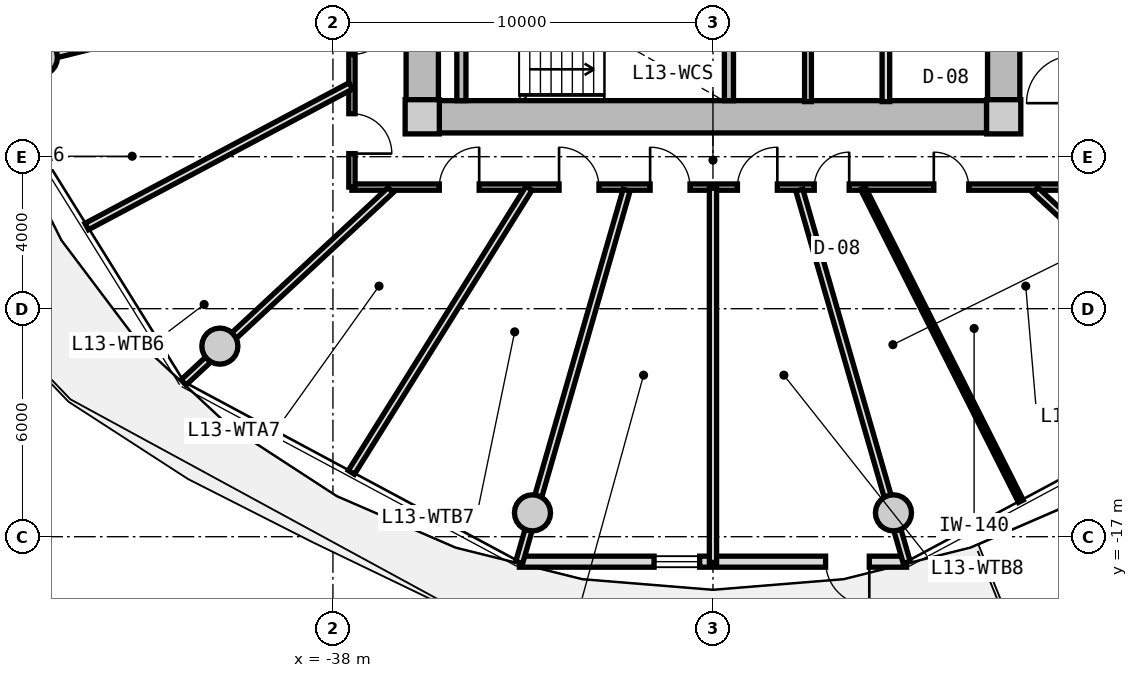
"""IFC4 building model, lengths in metres.
Left out: names, types, materials, properties, quantities, classifications, styles, units other than length and angle.
Written with IfcOpenShell. Run it as: python <this file> out.ifc"""

import sys

from ifc_helpers import new_model, si_unit, direction, frame, frame_2d, origin, origin_2d, place, context, subcontext, project, spatial, rectangle, circle, extrude, source, transform, mapped, element, fill, save


model = new_model("IFC4")
c1 = context("Model", 3, precision=1e-05, world=origin(), true_north=direction((0.0, 1.0)))
c2 = subcontext(c1, "Body", "Model", "MODEL_VIEW")
j1 = project(units=[si_unit("LENGTHUNIT", "METRE"), si_unit("PLANEANGLEUNIT", "RADIAN")], contexts=[c1])
p1 = place(None, origin())
s1 = spatial("IfcSite", under=j1, at=p1, CompositionType="ELEMENT")
p2 = place(p1, origin())
s2 = spatial("IfcBuilding", under=s1, at=p2, CompositionType="ELEMENT")
p3 = place(p2, frame((0.0, 0.0, 46.0)))
s3 = spatial("IfcBuildingStorey", under=s2, at=p3, CompositionType="ELEMENT", Elevation=46.0)
m1 = source(origin(), c2, "Body", "SweptSolid", [
    extrude(rectangle(XDim=0.9, YDim=0.9, at=origin_2d()), origin(), (0.0, 0.0, 1.0), 3.05),
])
for number, where, z_axis, x_axis in (
    (1, (-35.65, -5.95, 0.0), (0.0, 0.0, 1.0), (1.0, 0.0, 0.0)),
    (2, (-20.35, -5.95, 0.0), (0.0, 0.0, 1.0), (1.0, 0.0, 0.0)),
):
    element("IfcColumn", number, at=place(p3, frame(where, z_axis=z_axis, x_axis=x_axis)), inside=s3, PredefinedType="COLUMN", context=c2, shape_type="MappedRepresentation", body=[
        mapped(m1, transform((0.0, 0.0, 0.0), x_axis=(1.0, 0.0, 0.0), y_axis=(0.0, 1.0, 0.0), z_axis=(0.0, 0.0, 1.0), scale=1.0)),
    ])
m2 = source(origin(), c2, "Body", "SweptSolid", [
    extrude(rectangle(XDim=14.4, YDim=0.85, at=frame_2d((7.2, 0.0))), origin(), (0.0, 0.0, 1.0), 2.79),
])
p4 = place(p3, frame((-20.8, -5.95, 0.0), z_axis=(0.0, 0.0, 1.0), x_axis=(-1.0, 0.0, 0.0)))
e3 = element("IfcWall", 3, at=p4, inside=s3, PredefinedType="SHEAR", context=c2, shape_type="MappedRepresentation", body=[
    mapped(m2, transform((0.0, 0.0, 0.0), x_axis=(1.0, 0.0, 0.0), y_axis=(0.0, 1.0, 0.0), z_axis=(0.0, 0.0, 1.0), scale=1.0)),
])
m3 = source(origin(), c2, "Body", "SweptSolid", [
    extrude(rectangle(XDim=11.0, YDim=0.85, at=frame_2d((5.5, 0.0))), origin(), (0.0, 0.0, 1.0), 2.79),
])
p5 = place(p3, frame((-35.65, -5.5, 0.0), z_axis=(0.0, 0.0, 1.0), x_axis=(0.0, 1.0, 0.0)))
e4 = element("IfcWall", 4, at=p5, inside=s3, PredefinedType="SHEAR", context=c2, shape_type="MappedRepresentation", body=[
    mapped(m3, transform((0.0, 0.0, 0.0), x_axis=(1.0, 0.0, 0.0), y_axis=(0.0, 1.0, 0.0), z_axis=(0.0, 0.0, 1.0), scale=1.0)),
])
p6 = place(p5, frame((3.8, 0.0, 0.0)))
e5 = element("IfcOpeningElement", 5, at=p6, cuts=e4, PredefinedType="OPENING", context=c2, shape_type="SweptSolid", body=[
    extrude(rectangle(XDim=1.2, YDim=2.15, at=frame_2d((0.6, 1.075))), frame((0.0, 0.435, 0.0), z_axis=(0.0, -1.0, 0.0), x_axis=(1.0, 0.0, 0.0)), (0.0, 0.0, 1.0), 0.87),
])
p7 = place(p3, frame((-20.35, 5.5, 0.0), z_axis=(0.0, 0.0, 1.0), x_axis=(0.0, -1.0, 0.0)))
e6 = element("IfcWall", 6, at=p7, inside=s3, PredefinedType="SHEAR", context=c2, shape_type="MappedRepresentation", body=[
    mapped(m3, transform((0.0, 0.0, 0.0), x_axis=(1.0, 0.0, 0.0), y_axis=(0.0, 1.0, 0.0), z_axis=(0.0, 0.0, 1.0), scale=1.0)),
])
p8 = place(p7, frame((5.65, 0.0, 0.0)))
e7 = element("IfcOpeningElement", 7, at=p8, cuts=e6, PredefinedType="OPENING", context=c2, shape_type="SweptSolid", body=[
    extrude(rectangle(XDim=1.2, YDim=2.15, at=frame_2d((0.6, 1.075))), frame((0.0, 0.435, 0.0), z_axis=(0.0, -1.0, 0.0), x_axis=(1.0, 0.0, 0.0)), (0.0, 0.0, 1.0), 0.87),
])
m4 = source(origin(), c2, "Body", "SweptSolid", [
    extrude(circle(Radius=0.475, at=origin_2d()), origin(), (0.0, 0.0, 1.0), 3.05),
])
for number, where, z_axis, x_axis in (
    (8, (-45.725, -4.387, 0.0), (0.0, 0.0, 1.0), (1.0, 0.0, 0.0)),
    (9, (-40.975, -11.985, 0.0), (0.0, 0.0, 1.0), (1.0, 0.0, 0.0)),
    (10, (-32.749, -16.373, 0.0), (0.0, 0.0, 1.0), (1.0, 0.0, 0.0)),
    (11, (-23.251, -16.373, 0.0), (0.0, 0.0, 1.0), (1.0, 0.0, 0.0)),
):
    element("IfcColumn", number, at=place(p3, frame(where, z_axis=z_axis, x_axis=x_axis)), inside=s3, PredefinedType="COLUMN", context=c2, shape_type="MappedRepresentation", body=[
        mapped(m4, transform((0.0, 0.0, 0.0), x_axis=(1.0, 0.0, 0.0), y_axis=(0.0, 1.0, 0.0), z_axis=(0.0, 0.0, 1.0), scale=1.0)),
    ])
m5 = source(origin(), c2, "Body", "SweptSolid", [
    extrude(rectangle(XDim=10.187, YDim=0.29, at=frame_2d((5.094, 0.0))), origin(), (0.0, 0.0, 1.0), 2.79),
])
p9 = place(p3, frame((-22.906, -17.657, 0.0), z_axis=(0.0, 0.0, 1.0), x_axis=(-1.0, 0.0, 0.0)))
e12 = element("IfcWall", 12, at=p9, inside=s3, PredefinedType="SOLIDWALL", context=c2, shape_type="MappedRepresentation", body=[
    mapped(m5, transform((0.0, 0.0, 0.0), x_axis=(1.0, 0.0, 0.0), y_axis=(0.0, 1.0, 0.0), z_axis=(0.0, 0.0, 1.0), scale=1.0)),
])
p10 = place(p9, frame((0.98, 0.0, 0.0)))
e13 = element("IfcOpeningElement", 13, at=p10, cuts=e12, PredefinedType="OPENING", context=c2, shape_type="SweptSolid", body=[
    extrude(rectangle(XDim=1.15, YDim=2.25, at=frame_2d((0.575, 1.125))), frame((0.0, 0.155, 0.0), z_axis=(0.0, -1.0, 0.0), x_axis=(1.0, 0.0, 0.0)), (0.0, 0.0, 1.0), 0.31),
])
p11 = place(p9, frame((5.444, 0.0, 0.85)))
e14 = element("IfcOpeningElement", 14, at=p11, cuts=e12, PredefinedType="OPENING", context=c2, shape_type="SweptSolid", body=[
    extrude(rectangle(XDim=1.2, YDim=1.5, at=frame_2d((0.6, 0.75))), frame((0.0, 0.155, 0.0), z_axis=(0.0, -1.0, 0.0), x_axis=(1.0, 0.0, 0.0)), (0.0, 0.0, 1.0), 0.31),
])
m6 = source(origin(), c2, "Body", "SweptSolid", [
    extrude(rectangle(XDim=3.075, YDim=0.24, at=frame_2d((1.538, 0.0))), origin(), (0.0, 0.0, 1.0), 2.79),
])
for number, where, z_axis, x_axis in (
    (15, (-34.62, -5.525, 0.0), (0.0, 0.0, 1.0), (0.0, 1.0, 0.0)),
    (16, (-27.58, -5.525, 0.0), (0.0, 0.0, 1.0), (0.0, 1.0, 0.0)),
):
    element("IfcWall", number, at=place(p3, frame(where, z_axis=z_axis, x_axis=x_axis)), inside=s3, PredefinedType="PARTITIONING", context=c2, shape_type="MappedRepresentation", body=[
        mapped(m6, transform((0.0, 0.0, 0.0), x_axis=(1.0, 0.0, 0.0), y_axis=(0.0, 1.0, 0.0), z_axis=(0.0, 0.0, 1.0), scale=1.0)),
    ])
m7 = source(origin(), c2, "Body", "SweptSolid", [
    extrude(rectangle(XDim=3.8, YDim=0.2, at=frame_2d((1.9, 0.0))), origin(), (0.0, 0.0, 1.0), 2.775),
])
p12 = place(p3, frame((-23.45, -5.55, 0.0), z_axis=(0.0, 0.0, 1.0), x_axis=(0.0, 1.0, 0.0)))
e17 = element("IfcWall", 17, at=p12, inside=s3, PredefinedType="PARTITIONING", context=c2, shape_type="MappedRepresentation", body=[
    mapped(m7, transform((0.0, 0.0, 0.0), x_axis=(1.0, 0.0, 0.0), y_axis=(0.0, 1.0, 0.0), z_axis=(0.0, 0.0, 1.0), scale=1.0)),
])
m8 = source(origin(), c2, "Body", "SweptSolid", [
    extrude(rectangle(XDim=3.22, YDim=0.18, at=frame_2d((1.61, 0.0))), origin(), (0.0, 0.0, 1.0), 2.775),
])
p13 = place(p3, frame((-25.5, -5.55, 0.0), z_axis=(0.0, 0.0, 1.0), x_axis=(0.0, 1.0, 0.0)))
e18 = element("IfcWall", 18, at=p13, inside=s3, PredefinedType="PARTITIONING", context=c2, shape_type="MappedRepresentation", body=[
    mapped(m8, transform((0.0, 0.0, 0.0), x_axis=(1.0, 0.0, 0.0), y_axis=(0.0, 1.0, 0.0), z_axis=(0.0, 0.0, 1.0), scale=1.0)),
])
m9 = source(origin(), c2, "Body", "SweptSolid", [
    extrude(rectangle(XDim=19.0, YDim=0.165, at=frame_2d((9.5, 0.0))), origin(), (0.0, 0.0, 1.0), 2.775),
])
p14 = place(p3, frame((-18.5, -7.8, 0.0), z_axis=(0.0, 0.0, 1.0), x_axis=(-1.0, 0.0, 0.0)))
e19 = element("IfcWall", 19, at=p14, inside=s3, PredefinedType="PARTITIONING", context=c2, shape_type="MappedRepresentation", body=[
    mapped(m9, transform((0.0, 0.0, 0.0), x_axis=(1.0, 0.0, 0.0), y_axis=(0.0, 1.0, 0.0), z_axis=(0.0, 0.0, 1.0), scale=1.0)),
])
p15 = place(p14, frame((15.652, 0.0, 0.0)))
e20 = element("IfcOpeningElement", 20, at=p15, cuts=e19, PredefinedType="OPENING", context=c2, shape_type="SweptSolid", body=[
    extrude(rectangle(XDim=1.05, YDim=2.15, at=frame_2d((0.525, 1.075))), frame((0.0, 0.093, 0.0), z_axis=(0.0, -1.0, 0.0), x_axis=(1.0, 0.0, 0.0)), (0.0, 0.0, 1.0), 0.185),
])
p16 = place(p14, frame((12.5, 0.0, 0.0)))
e21 = element("IfcOpeningElement", 21, at=p16, cuts=e19, PredefinedType="OPENING", context=c2, shape_type="SweptSolid", body=[
    extrude(rectangle(XDim=1.05, YDim=2.15, at=frame_2d((0.525, 1.075))), frame((0.0, 0.093, 0.0), z_axis=(0.0, -1.0, 0.0), x_axis=(1.0, 0.0, 0.0)), (0.0, 0.0, 1.0), 0.185),
])
p17 = place(p14, frame((10.104, 0.0, 0.0)))
e22 = element("IfcOpeningElement", 22, at=p17, cuts=e19, PredefinedType="OPENING", context=c2, shape_type="SweptSolid", body=[
    extrude(rectangle(XDim=1.05, YDim=2.15, at=frame_2d((0.525, 1.075))), frame((0.0, 0.093, 0.0), z_axis=(0.0, -1.0, 0.0), x_axis=(1.0, 0.0, 0.0)), (0.0, 0.0, 1.0), 0.185),
])
p18 = place(p14, frame((7.806, 0.0, 0.0)))
e23 = element("IfcOpeningElement", 23, at=p18, cuts=e19, PredefinedType="OPENING", context=c2, shape_type="SweptSolid", body=[
    extrude(rectangle(XDim=1.05, YDim=2.15, at=frame_2d((0.525, 1.075))), frame((0.0, 0.093, 0.0), z_axis=(0.0, -1.0, 0.0), x_axis=(1.0, 0.0, 0.0)), (0.0, 0.0, 1.0), 0.185),
])
p19 = place(p14, frame((5.915, 0.0, 0.0)))
e24 = element("IfcOpeningElement", 24, at=p19, cuts=e19, PredefinedType="OPENING", context=c2, shape_type="SweptSolid", body=[
    extrude(rectangle(XDim=0.92, YDim=2.1, at=frame_2d((0.46, 1.05))), frame((0.0, 0.093, 0.0), z_axis=(0.0, -1.0, 0.0), x_axis=(1.0, 0.0, 0.0)), (0.0, 0.0, 1.0), 0.185),
])
p20 = place(p14, frame((2.769, 0.0, 0.0)))
e25 = element("IfcOpeningElement", 25, at=p20, cuts=e19, PredefinedType="OPENING", context=c2, shape_type="SweptSolid", body=[
    extrude(rectangle(XDim=0.92, YDim=2.1, at=frame_2d((0.46, 1.05))), frame((0.0, 0.093, 0.0), z_axis=(0.0, -1.0, 0.0), x_axis=(1.0, 0.0, 0.0)), (0.0, 0.0, 1.0), 0.185),
])
m10 = source(origin(), c2, "Body", "SweptSolid", [
    extrude(rectangle(XDim=15.6, YDim=0.165, at=frame_2d((7.8, 0.0))), origin(), (0.0, 0.0, 1.0), 2.775),
])
p21 = place(p3, frame((-37.5, -7.8, 0.0), z_axis=(0.0, 0.0, 1.0), x_axis=(0.0, 1.0, 0.0)))
e26 = element("IfcWall", 26, at=p21, inside=s3, PredefinedType="PARTITIONING", context=c2, shape_type="MappedRepresentation", body=[
    mapped(m10, transform((0.0, 0.0, 0.0), x_axis=(1.0, 0.0, 0.0), y_axis=(0.0, 1.0, 0.0), z_axis=(0.0, 0.0, 1.0), scale=1.0)),
])
p22 = place(p21, frame((13.293, 0.0, 0.0)))
e27 = element("IfcOpeningElement", 27, at=p22, cuts=e26, PredefinedType="OPENING", context=c2, shape_type="SweptSolid", body=[
    extrude(rectangle(XDim=1.05, YDim=2.15, at=frame_2d((0.525, 1.075))), frame((0.0, 0.093, 0.0), z_axis=(0.0, -1.0, 0.0), x_axis=(1.0, 0.0, 0.0)), (0.0, 0.0, 1.0), 0.185),
])
p23 = place(p21, frame((11.018, 0.0, 0.0)))
e28 = element("IfcOpeningElement", 28, at=p23, cuts=e26, PredefinedType="OPENING", context=c2, shape_type="SweptSolid", body=[
    extrude(rectangle(XDim=1.05, YDim=2.15, at=frame_2d((0.525, 1.075))), frame((0.0, 0.093, 0.0), z_axis=(0.0, -1.0, 0.0), x_axis=(1.0, 0.0, 0.0)), (0.0, 0.0, 1.0), 0.185),
])
p24 = place(p21, frame((7.812, 0.0, 0.0)))
e29 = element("IfcOpeningElement", 29, at=p24, cuts=e26, PredefinedType="OPENING", context=c2, shape_type="SweptSolid", body=[
    extrude(rectangle(XDim=1.05, YDim=2.15, at=frame_2d((0.525, 1.075))), frame((0.0, 0.093, 0.0), z_axis=(0.0, -1.0, 0.0), x_axis=(1.0, 0.0, 0.0)), (0.0, 0.0, 1.0), 0.185),
])
p25 = place(p21, frame((6.035, 0.0, 0.0)))
e30 = element("IfcOpeningElement", 30, at=p25, cuts=e26, PredefinedType="OPENING", context=c2, shape_type="SweptSolid", body=[
    extrude(rectangle(XDim=1.05, YDim=2.15, at=frame_2d((0.525, 1.075))), frame((0.0, 0.093, 0.0), z_axis=(0.0, -1.0, 0.0), x_axis=(1.0, 0.0, 0.0)), (0.0, 0.0, 1.0), 0.185),
])
p26 = place(p21, frame((3.489, 0.0, 0.0)))
e31 = element("IfcOpeningElement", 31, at=p26, cuts=e26, PredefinedType="OPENING", context=c2, shape_type="SweptSolid", body=[
    extrude(rectangle(XDim=1.05, YDim=2.15, at=frame_2d((0.525, 1.075))), frame((0.0, 0.093, 0.0), z_axis=(0.0, -1.0, 0.0), x_axis=(1.0, 0.0, 0.0)), (0.0, 0.0, 1.0), 0.185),
])
p27 = place(p21, frame((0.882, 0.0, 0.0)))
e32 = element("IfcOpeningElement", 32, at=p27, cuts=e26, PredefinedType="OPENING", context=c2, shape_type="SweptSolid", body=[
    extrude(rectangle(XDim=1.05, YDim=2.15, at=frame_2d((0.525, 1.075))), frame((0.0, 0.093, 0.0), z_axis=(0.0, -1.0, 0.0), x_axis=(1.0, 0.0, 0.0)), (0.0, 0.0, 1.0), 0.185),
])
m11 = source(origin(), c2, "Body", "SweptSolid", [
    extrude(rectangle(XDim=9.737, YDim=0.19, at=frame_2d((4.869, 0.0))), origin(), (0.0, 0.0, 1.0), 2.225),
])
p28 = place(p3, frame((-37.58, -2.385, 0.0), z_axis=(0.0, 0.0, 1.0), x_axis=(-0.970392716238, -0.241532557375, 0.0)))
e33 = element("IfcWall", 33, at=p28, inside=s3, PredefinedType="PARTITIONING", context=c2, shape_type="MappedRepresentation", body=[
    mapped(m11, transform((0.0, 0.0, 0.0), x_axis=(1.0, 0.0, 0.0), y_axis=(0.0, 1.0, 0.0), z_axis=(0.0, 0.0, 1.0), scale=1.0)),
])
m12 = source(origin(), c2, "Body", "SweptSolid", [
    extrude(rectangle(XDim=7.435, YDim=0.19, at=frame_2d((3.717, 0.0))), origin(), (0.0, 0.0, 1.0), 2.225),
])
p29 = place(p3, frame((-36.483, -7.88, 0.0), z_axis=(0.0, 0.0, 1.0), x_axis=(-0.732651956848, -0.680603489652, 0.0)))
e34 = element("IfcWall", 34, at=p29, inside=s3, PredefinedType="PARTITIONING", context=c2, shape_type="MappedRepresentation", body=[
    mapped(m12, transform((0.0, 0.0, 0.0), x_axis=(1.0, 0.0, 0.0), y_axis=(0.0, 1.0, 0.0), z_axis=(0.0, 0.0, 1.0), scale=1.0)),
])
m13 = source(origin(), c2, "Body", "SweptSolid", [
    extrude(rectangle(XDim=7.873, YDim=0.19, at=frame_2d((3.937, 0.0))), origin(), (0.0, 0.0, 1.0), 2.775),
])
p30 = place(p3, frame((-37.53, -5.138, 0.0), z_axis=(0.0, 0.0, 1.0), x_axis=(-0.882666052726, -0.470000680175, 0.0)))
e35 = element("IfcWall", 35, at=p30, inside=s3, PredefinedType="PARTITIONING", context=c2, shape_type="MappedRepresentation", body=[
    mapped(m13, transform((0.0, 0.0, 0.0), x_axis=(1.0, 0.0, 0.0), y_axis=(0.0, 1.0, 0.0), z_axis=(0.0, 0.0, 1.0), scale=1.0)),
])
m14 = source(origin(), c2, "Body", "SweptSolid", [
    extrude(rectangle(XDim=10.196, YDim=0.19, at=frame_2d((5.098, 0.0))), origin(), (0.0, 0.0, 1.0), 2.225),
])
p31 = place(p3, frame((-30.273, -7.88, 0.0), z_axis=(0.0, 0.0, 1.0), x_axis=(-0.277136420347, -0.960830580549, 0.0)))
e36 = element("IfcWall", 36, at=p31, inside=s3, PredefinedType="PARTITIONING", context=c2, shape_type="MappedRepresentation", body=[
    mapped(m14, transform((0.0, 0.0, 0.0), x_axis=(1.0, 0.0, 0.0), y_axis=(0.0, 1.0, 0.0), z_axis=(0.0, 0.0, 1.0), scale=1.0)),
])
m15 = source(origin(), c2, "Body", "SweptSolid", [
    extrude(rectangle(XDim=8.818, YDim=0.19, at=frame_2d((4.409, 0.0))), origin(), (0.0, 0.0, 1.0), 2.775),
])
p32 = place(p3, frame((-32.841, -7.83, 0.0), z_axis=(0.0, 0.0, 1.0), x_axis=(-0.529931746109, -0.848040296487, 0.0)))
e37 = element("IfcWall", 37, at=p32, inside=s3, PredefinedType="PARTITIONING", context=c2, shape_type="MappedRepresentation", body=[
    mapped(m15, transform((0.0, 0.0, 0.0), x_axis=(1.0, 0.0, 0.0), y_axis=(0.0, 1.0, 0.0), z_axis=(0.0, 0.0, 1.0), scale=1.0)),
])
p33 = place(p3, frame((-25.727, -7.88, 0.0), z_axis=(0.0, 0.0, 1.0), x_axis=(0.277136420347, -0.960830580549, 0.0)))
e38 = element("IfcWall", 38, at=p33, inside=s3, PredefinedType="PARTITIONING", context=c2, shape_type="MappedRepresentation", body=[
    mapped(m14, transform((0.0, 0.0, 0.0), x_axis=(1.0, 0.0, 0.0), y_axis=(0.0, 1.0, 0.0), z_axis=(0.0, 0.0, 1.0), scale=1.0)),
])
m16 = source(origin(), c2, "Body", "SweptSolid", [
    extrude(rectangle(XDim=9.846, YDim=0.19, at=frame_2d((4.923, 0.0))), origin(), (0.0, 0.0, 1.0), 2.775),
])
p34 = place(p3, frame((-28.0, -7.83, 0.0), z_axis=(0.0, 0.0, 1.0), x_axis=(0.0, -1.0, 0.0)))
e39 = element("IfcWall", 39, at=p34, inside=s3, PredefinedType="PARTITIONING", context=c2, shape_type="MappedRepresentation", body=[
    mapped(m16, transform((0.0, 0.0, 0.0), x_axis=(1.0, 0.0, 0.0), y_axis=(0.0, 1.0, 0.0), z_axis=(0.0, 0.0, 1.0), scale=1.0)),
])
p35 = place(p3, frame((-19.517, -7.88, 0.0), z_axis=(0.0, 0.0, 1.0), x_axis=(0.732651956848, -0.680603489652, 0.0)))
e40 = element("IfcWall", 40, at=p35, inside=s3, PredefinedType="PARTITIONING", context=c2, shape_type="MappedRepresentation", body=[
    mapped(m12, transform((0.0, 0.0, 0.0), x_axis=(1.0, 0.0, 0.0), y_axis=(0.0, 1.0, 0.0), z_axis=(0.0, 0.0, 1.0), scale=1.0)),
])
m17 = source(origin(), c2, "Body", "SweptSolid", [
    extrude(rectangle(XDim=9.225, YDim=0.14, at=frame_2d((4.613, 0.0))), origin(), (0.0, 0.0, 1.0), 2.775),
])
p36 = place(p3, frame((-24.054, -7.83, 0.0), z_axis=(0.0, 0.0, 1.0), x_axis=(0.450460543767, -0.892796336523, 0.0)))
e41 = element("IfcWall", 41, at=p36, inside=s3, PredefinedType="PARTITIONING", context=c2, shape_type="MappedRepresentation", body=[
    mapped(m17, transform((0.0, 0.0, 0.0), x_axis=(1.0, 0.0, 0.0), y_axis=(0.0, 1.0, 0.0), z_axis=(0.0, 0.0, 1.0), scale=1.0)),
])
m18 = source(origin(), c2, "Body", "SweptSolid", [
    extrude(rectangle(XDim=1.15, YDim=2.25, at=frame_2d((0.575, 1.125))), frame((0.0, 0.025, 0.0), z_axis=(0.0, -1.0, 0.0), x_axis=(1.0, 0.0, 0.0)), (0.0, 0.0, 1.0), 0.05),
])
p37 = place(p10, origin())
e42 = element("IfcDoor", 42, at=p37, inside=s3, OperationType="SINGLE_SWING_LEFT", PredefinedType="DOOR", context=c2, shape_type="MappedRepresentation", body=[
    mapped(m18, transform((0.0, 0.0, 0.0), x_axis=(1.0, 0.0, 0.0), y_axis=(0.0, 1.0, 0.0), z_axis=(0.0, 0.0, 1.0), scale=1.0)),
])
fill(e13, e42)
m19 = source(origin(), c2, "Body", "SweptSolid", [
    extrude(rectangle(XDim=1.2, YDim=1.5, at=frame_2d((0.6, 0.75))), frame((0.0, 0.03, 0.0), z_axis=(0.0, -1.0, 0.0), x_axis=(1.0, 0.0, 0.0)), (0.0, 0.0, 1.0), 0.06),
])
p38 = place(p11, origin())
e43 = element("IfcWindow", 43, at=p38, inside=s3, PartitioningType="SINGLE_PANEL", PredefinedType="WINDOW", context=c2, shape_type="MappedRepresentation", body=[
    mapped(m19, transform((0.0, 0.0, 0.0), x_axis=(1.0, 0.0, 0.0), y_axis=(0.0, 1.0, 0.0), z_axis=(0.0, 0.0, 1.0), scale=1.0)),
])
fill(e14, e43)
m20 = source(origin(), c2, "Body", "SweptSolid", [
    extrude(rectangle(XDim=1.05, YDim=2.15, at=frame_2d((0.525, 1.075))), frame((0.0, 0.025, 0.0), z_axis=(0.0, -1.0, 0.0), x_axis=(1.0, 0.0, 0.0)), (0.0, 0.0, 1.0), 0.05),
])
p39 = place(p26, frame((1.05, 0.0, 0.0), z_axis=(0.0, 0.0, 1.0), x_axis=(-1.0, 0.0, 0.0)))
e44 = element("IfcDoor", 44, at=p39, inside=s3, OperationType="SINGLE_SWING_LEFT", PredefinedType="DOOR", context=c2, shape_type="MappedRepresentation", body=[
    mapped(m20, transform((0.0, 0.0, 0.0), x_axis=(1.0, 0.0, 0.0), y_axis=(0.0, 1.0, 0.0), z_axis=(0.0, 0.0, 1.0), scale=1.0)),
])
fill(e31, e44)
p40 = place(p27, frame((1.05, 0.0, 0.0), z_axis=(0.0, 0.0, 1.0), x_axis=(-1.0, 0.0, 0.0)))
e45 = element("IfcDoor", 45, at=p40, inside=s3, OperationType="SINGLE_SWING_RIGHT", PredefinedType="DOOR", context=c2, shape_type="MappedRepresentation", body=[
    mapped(m20, transform((0.0, 0.0, 0.0), x_axis=(1.0, 0.0, 0.0), y_axis=(0.0, 1.0, 0.0), z_axis=(0.0, 0.0, 1.0), scale=1.0)),
])
fill(e32, e45)
p41 = place(p15, frame((1.05, 0.0, 0.0), z_axis=(0.0, 0.0, 1.0), x_axis=(-1.0, 0.0, 0.0)))
e46 = element("IfcDoor", 46, at=p41, inside=s3, OperationType="SINGLE_SWING_RIGHT", PredefinedType="DOOR", context=c2, shape_type="MappedRepresentation", body=[
    mapped(m20, transform((0.0, 0.0, 0.0), x_axis=(1.0, 0.0, 0.0), y_axis=(0.0, 1.0, 0.0), z_axis=(0.0, 0.0, 1.0), scale=1.0)),
])
fill(e20, e46)
p42 = place(p16, frame((1.05, 0.0, 0.0), z_axis=(0.0, 0.0, 1.0), x_axis=(-1.0, 0.0, 0.0)))
e47 = element("IfcDoor", 47, at=p42, inside=s3, OperationType="SINGLE_SWING_LEFT", PredefinedType="DOOR", context=c2, shape_type="MappedRepresentation", body=[
    mapped(m20, transform((0.0, 0.0, 0.0), x_axis=(1.0, 0.0, 0.0), y_axis=(0.0, 1.0, 0.0), z_axis=(0.0, 0.0, 1.0), scale=1.0)),
])
fill(e21, e47)
p43 = place(p17, frame((1.05, 0.0, 0.0), z_axis=(0.0, 0.0, 1.0), x_axis=(-1.0, 0.0, 0.0)))
e48 = element("IfcDoor", 48, at=p43, inside=s3, OperationType="SINGLE_SWING_LEFT", PredefinedType="DOOR", context=c2, shape_type="MappedRepresentation", body=[
    mapped(m20, transform((0.0, 0.0, 0.0), x_axis=(1.0, 0.0, 0.0), y_axis=(0.0, 1.0, 0.0), z_axis=(0.0, 0.0, 1.0), scale=1.0)),
])
fill(e22, e48)
p44 = place(p18, frame((1.05, 0.0, 0.0), z_axis=(0.0, 0.0, 1.0), x_axis=(-1.0, 0.0, 0.0)))
e49 = element("IfcDoor", 49, at=p44, inside=s3, OperationType="SINGLE_SWING_RIGHT", PredefinedType="DOOR", context=c2, shape_type="MappedRepresentation", body=[
    mapped(m20, transform((0.0, 0.0, 0.0), x_axis=(1.0, 0.0, 0.0), y_axis=(0.0, 1.0, 0.0), z_axis=(0.0, 0.0, 1.0), scale=1.0)),
])
fill(e23, e49)
m21 = source(origin(), c2, "Body", "SweptSolid", [
    extrude(rectangle(XDim=0.92, YDim=2.1, at=frame_2d((0.46, 1.05))), frame((0.0, 0.025, 0.0), z_axis=(0.0, -1.0, 0.0), x_axis=(1.0, 0.0, 0.0)), (0.0, 0.0, 1.0), 0.05),
])
p45 = place(p19, frame((0.92, 0.0, 0.0), z_axis=(0.0, 0.0, 1.0), x_axis=(-1.0, 0.0, 0.0)))
e50 = element("IfcDoor", 50, at=p45, inside=s3, OperationType="SINGLE_SWING_RIGHT", PredefinedType="DOOR", context=c2, shape_type="MappedRepresentation", body=[
    mapped(m21, transform((0.0, 0.0, 0.0), x_axis=(1.0, 0.0, 0.0), y_axis=(0.0, 1.0, 0.0), z_axis=(0.0, 0.0, 1.0), scale=1.0)),
])
fill(e24, e50)
p46 = place(p20, frame((0.92, 0.0, 0.0), z_axis=(0.0, 0.0, 1.0), x_axis=(-1.0, 0.0, 0.0)))
e51 = element("IfcDoor", 51, at=p46, inside=s3, OperationType="SINGLE_SWING_LEFT", PredefinedType="DOOR", context=c2, shape_type="MappedRepresentation", body=[
    mapped(m21, transform((0.0, 0.0, 0.0), x_axis=(1.0, 0.0, 0.0), y_axis=(0.0, 1.0, 0.0), z_axis=(0.0, 0.0, 1.0), scale=1.0)),
])
fill(e25, e51)
save(model, sys.argv[1])
